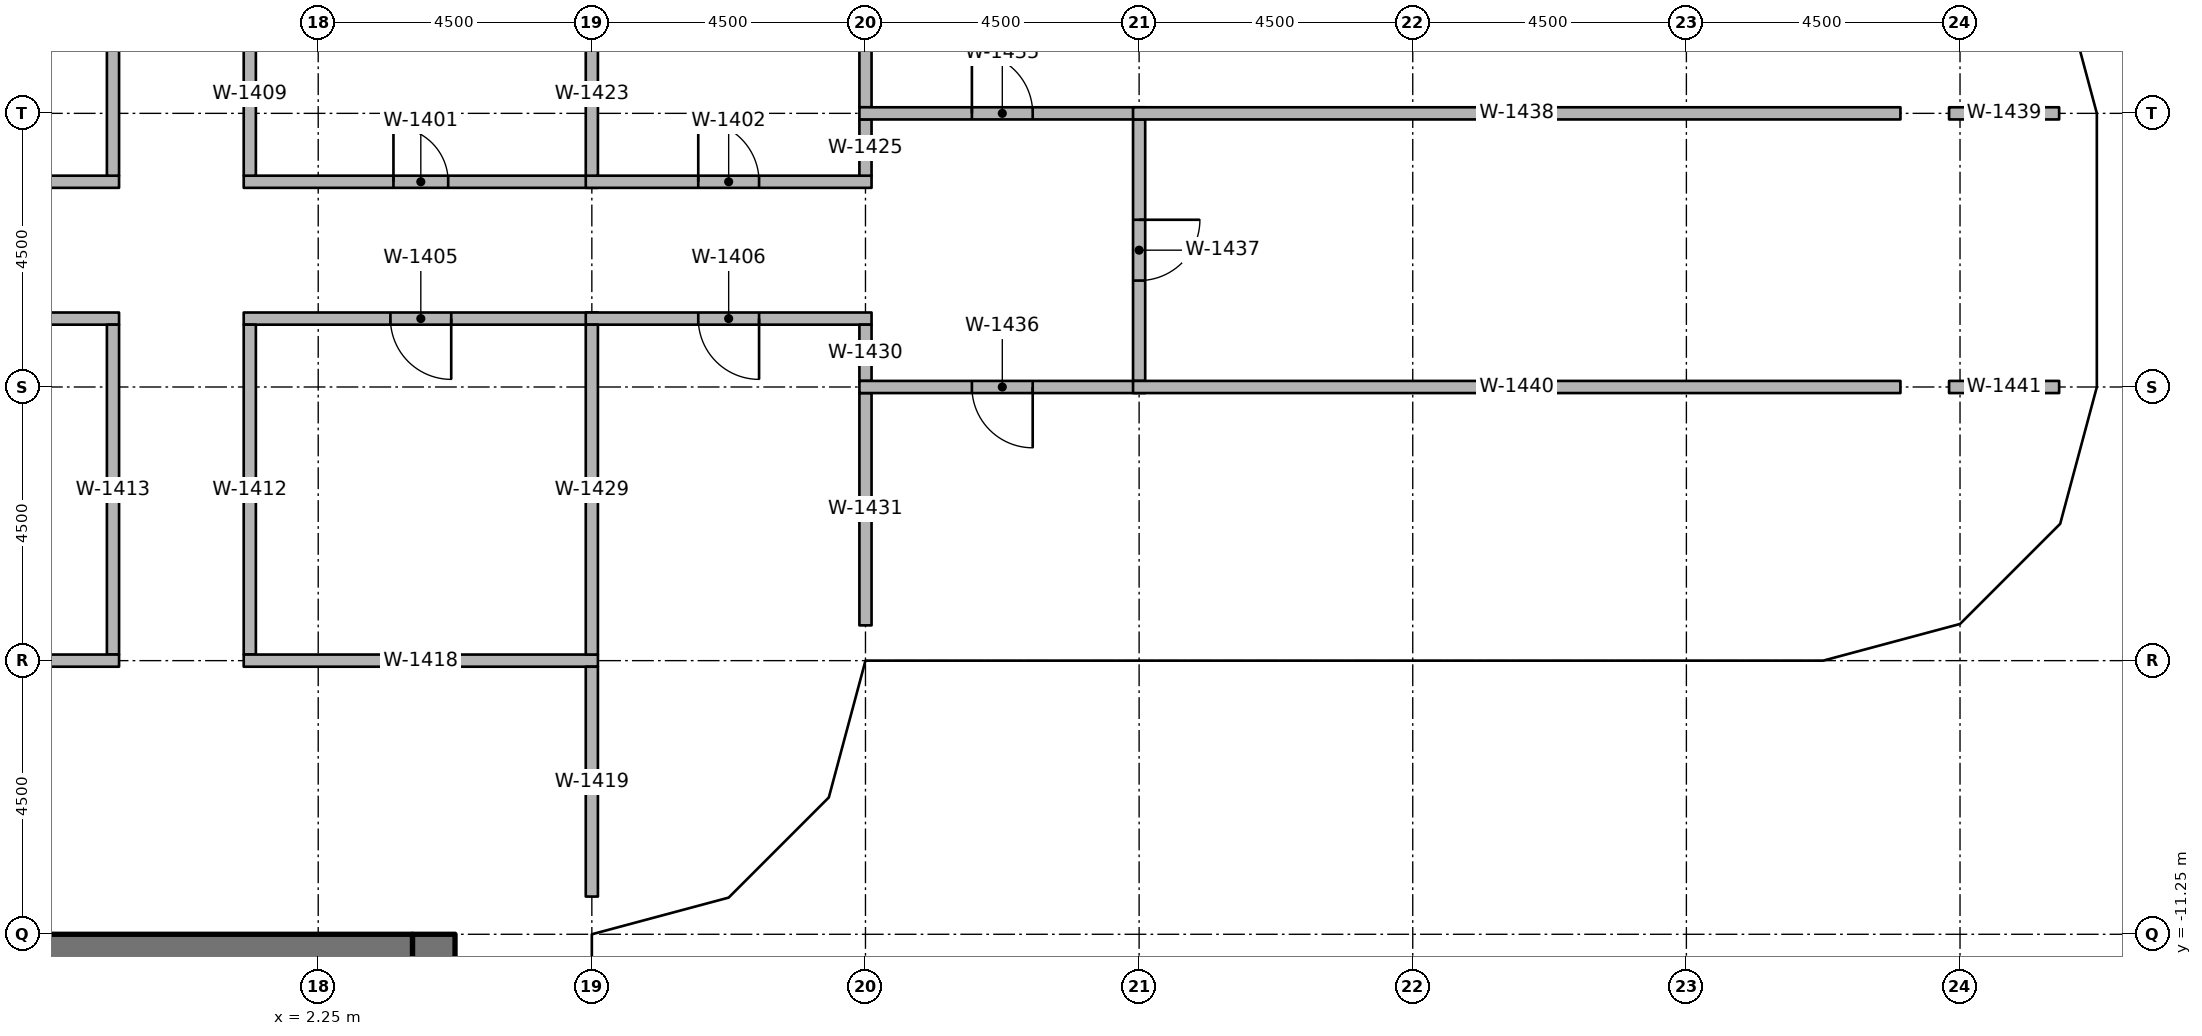
"""IFC4 building model, lengths in metres.
Left out: names, types, materials, properties, quantities, classifications, styles, units other than length and angle.
Written with IfcOpenShell. Run it as: python <this file> out.ifc"""

import sys

from ifc_helpers import new_model, si_unit, direction, frame, frame_2d, origin, origin_2d, place, context, subcontext, project, spatial, rectangle, extrude, element, fill, save


model = new_model("IFC4")
c1 = context("Model", 3, precision=1e-05, world=origin(), true_north=direction((0.0, 1.0)))
c2 = subcontext(c1, "Body", "Model", "MODEL_VIEW")
j1 = project(units=[si_unit("LENGTHUNIT", "METRE"), si_unit("PLANEANGLEUNIT", "RADIAN")], contexts=[c1])
p1 = place(None, origin())
s1 = spatial("IfcSite", under=j1, at=p1, CompositionType="ELEMENT")
p2 = place(p1, origin())
s2 = spatial("IfcBuilding", under=s1, at=p2, CompositionType="ELEMENT")
p3 = place(p2, frame((0.0, 0.0, 141.0)))
s3 = spatial("IfcBuildingStorey", under=s2, at=p3, CompositionType="ELEMENT", Elevation=141.0)
for number, where, z_axis, x_axis in (
    (1, (6.25, -10.75, 0.0), (0.0, 0.0, 1.0), (1.0, 0.0, 0.0)),
    (2, (6.25, -6.25, 0.0), (0.0, 0.0, 1.0), (1.0, 0.0, 0.0)),
    (3, (10.75, -6.25, 0.0), (0.0, 0.0, 1.0), (1.0, 0.0, 0.0)),
    (4, (15.75, -6.25, 0.0), (0.0, 0.0, 1.0), (1.0, 0.0, 0.0)),
    (5, (20.25, -6.11, 0.0), (0.0, 0.0, 1.0), (1.0, 0.0, 0.0)),
    (6, (24.75, -6.11, 0.0), (0.0, 0.0, 1.0), (1.0, 0.0, 0.0)),
    (7, (28.908, -5.475, 0.0), (0.0, 0.0, 1.0), (1.0, 0.0, 0.0)),
    (8, (28.67, -2.25, 0.0), (0.0, 0.0, 1.0), (1.0, 0.0, 0.0)),
    (9, (28.67, 2.25, 0.0), (0.0, 0.0, 1.0), (1.0, 0.0, 0.0)),
):
    element("IfcColumn", number, at=place(p3, frame(where, z_axis=z_axis, x_axis=x_axis)), inside=s3, PredefinedType="COLUMN", context=c2, shape_type="SweptSolid", body=[
        extrude(rectangle(XDim=0.8, YDim=0.8, at=origin_2d()), origin(), (0.0, 0.0, 1.0), 3.65),
    ])
p4 = place(p3, frame((4.15, -11.25, 0.0), z_axis=(0.0, 0.0, 1.0), x_axis=(0.0, -1.0, 0.0)))
e10 = element("IfcWall", 10, at=p4, inside=s3, PredefinedType="SHEAR", context=c2, shape_type="SweptSolid", body=[
    extrude(rectangle(XDim=15.0, YDim=0.7, at=frame_2d((7.5, 0.0))), origin(), (0.0, 0.0, 1.0), 3.8),
])
p5 = place(p4, frame((7.15, 0.0, 0.0)))
e11 = element("IfcOpeningElement", 11, at=p5, cuts=e10, PredefinedType="OPENING", context=c2, shape_type="SweptSolid", body=[
    extrude(rectangle(XDim=1.5, YDim=2.3, at=frame_2d((0.75, 1.15))), frame((0.0, 0.36, 0.0), z_axis=(0.0, -1.0, 0.0), x_axis=(1.0, 0.0, 0.0)), (0.0, 0.0, 1.0), 0.72),
])
p6 = place(p4, frame((13.9, 0.0, 0.0)))
e12 = element("IfcOpeningElement", 12, at=p6, cuts=e10, PredefinedType="OPENING", context=c2, shape_type="SweptSolid", body=[
    extrude(rectangle(XDim=0.9, YDim=2.1, at=frame_2d((0.45, 1.05))), frame((0.0, 0.36, 0.0), z_axis=(0.0, -1.0, 0.0), x_axis=(1.0, 0.0, 0.0)), (0.0, 0.0, 1.0), 0.72),
])
p7 = place(p4, frame((1.15, 0.0, 0.0)))
e13 = element("IfcOpeningElement", 13, at=p7, cuts=e10, PredefinedType="OPENING", context=c2, shape_type="SweptSolid", body=[
    extrude(rectangle(XDim=1.2, YDim=2.1, at=frame_2d((0.6, 1.05))), frame((0.0, 0.36, 0.0), z_axis=(0.0, -1.0, 0.0), x_axis=(1.0, 0.0, 0.0)), (0.0, 0.0, 1.0), 0.72),
])
p8 = place(p3, frame((-3.8, -11.6, 0.0), z_axis=(0.0, 0.0, 1.0), x_axis=(1.0, 0.0, 0.0)))
e14 = element("IfcWall", 14, at=p8, inside=s3, PredefinedType="SHEAR", context=c2, shape_type="SweptSolid", body=[
    extrude(rectangle(XDim=7.6, YDim=0.7, at=frame_2d((3.8, 0.0))), origin(), (0.0, 0.0, 1.0), 3.8),
])
p9 = place(p3, frame((1.025, 1.125, 0.0), z_axis=(0.0, 0.0, 1.0), x_axis=(1.0, 0.0, 0.0)))
e15 = element("IfcWall", 15, at=p9, inside=s3, PredefinedType="PARTITIONING", context=c2, shape_type="SweptSolid", body=[
    extrude(rectangle(XDim=5.825, YDim=0.2, at=frame_2d((2.913, 0.0))), origin(), (0.0, 0.0, 1.0), 2.75),
])
p10 = place(p9, frame((2.462, 0.0, 0.0)))
e16 = element("IfcOpeningElement", 16, at=p10, cuts=e15, PredefinedType="OPENING", context=c2, shape_type="SweptSolid", body=[
    extrude(rectangle(XDim=0.9, YDim=2.1, at=frame_2d((0.45, 1.05))), frame((0.0, 0.11, 0.0), z_axis=(0.0, -1.0, 0.0), x_axis=(1.0, 0.0, 0.0)), (0.0, 0.0, 1.0), 0.22),
])
p11 = place(p3, frame((6.65, 1.125, 0.0), z_axis=(0.0, 0.0, 1.0), x_axis=(1.0, 0.0, 0.0)))
e17 = element("IfcWall", 17, at=p11, inside=s3, PredefinedType="PARTITIONING", context=c2, shape_type="SweptSolid", body=[
    extrude(rectangle(XDim=4.7, YDim=0.2, at=frame_2d((2.35, 0.0))), origin(), (0.0, 0.0, 1.0), 2.75),
])
p12 = place(p11, frame((1.85, 0.0, 0.0)))
e18 = element("IfcOpeningElement", 18, at=p12, cuts=e17, PredefinedType="OPENING", context=c2, shape_type="SweptSolid", body=[
    extrude(rectangle(XDim=1.0, YDim=2.1, at=frame_2d((0.5, 1.05))), frame((0.0, 0.11, 0.0), z_axis=(0.0, -1.0, 0.0), x_axis=(1.0, 0.0, 0.0)), (0.0, 0.0, 1.0), 0.22),
])
p13 = place(p3, frame((-6.85, 1.125, 0.0), z_axis=(0.0, 0.0, 1.0), x_axis=(1.0, 0.0, 0.0)))
e19 = element("IfcWall", 19, at=p13, inside=s3, PredefinedType="PARTITIONING", context=c2, shape_type="SweptSolid", body=[
    extrude(rectangle(XDim=5.825, YDim=0.2, at=frame_2d((2.913, 0.0))), origin(), (0.0, 0.0, 1.0), 2.75),
])
p14 = place(p13, frame((2.413, 0.0, 0.0)))
e20 = element("IfcOpeningElement", 20, at=p14, cuts=e19, PredefinedType="OPENING", context=c2, shape_type="SweptSolid", body=[
    extrude(rectangle(XDim=1.0, YDim=2.1, at=frame_2d((0.5, 1.05))), frame((0.0, 0.11, 0.0), z_axis=(0.0, -1.0, 0.0), x_axis=(1.0, 0.0, 0.0)), (0.0, 0.0, 1.0), 0.22),
])
p15 = place(p3, frame((6.85, -1.125, 0.0), z_axis=(0.0, 0.0, 1.0), x_axis=(-1.0, 0.0, 0.0)))
e21 = element("IfcWall", 21, at=p15, inside=s3, PredefinedType="PARTITIONING", context=c2, shape_type="SweptSolid", body=[
    extrude(rectangle(XDim=5.825, YDim=0.2, at=frame_2d((2.913, 0.0))), origin(), (0.0, 0.0, 1.0), 2.75),
])
p16 = place(p15, frame((2.413, 0.0, 0.0)))
e22 = element("IfcOpeningElement", 22, at=p16, cuts=e21, PredefinedType="OPENING", context=c2, shape_type="SweptSolid", body=[
    extrude(rectangle(XDim=1.0, YDim=2.1, at=frame_2d((0.5, 1.05))), frame((0.0, 0.11, 0.0), z_axis=(0.0, -1.0, 0.0), x_axis=(1.0, 0.0, 0.0)), (0.0, 0.0, 1.0), 0.22),
])
p17 = place(p3, frame((11.35, -1.125, 0.0), z_axis=(0.0, 0.0, 1.0), x_axis=(-1.0, 0.0, 0.0)))
e23 = element("IfcWall", 23, at=p17, inside=s3, PredefinedType="PARTITIONING", context=c2, shape_type="SweptSolid", body=[
    extrude(rectangle(XDim=4.7, YDim=0.2, at=frame_2d((2.35, 0.0))), origin(), (0.0, 0.0, 1.0), 2.75),
])
p18 = place(p17, frame((1.85, 0.0, 0.0)))
e24 = element("IfcOpeningElement", 24, at=p18, cuts=e23, PredefinedType="OPENING", context=c2, shape_type="SweptSolid", body=[
    extrude(rectangle(XDim=1.0, YDim=2.1, at=frame_2d((0.5, 1.05))), frame((0.0, 0.11, 0.0), z_axis=(0.0, -1.0, 0.0), x_axis=(1.0, 0.0, 0.0)), (0.0, 0.0, 1.0), 0.22),
])
p19 = place(p3, frame((-1.025, -1.125, 0.0), z_axis=(0.0, 0.0, 1.0), x_axis=(-1.0, 0.0, 0.0)))
e25 = element("IfcWall", 25, at=p19, inside=s3, PredefinedType="PARTITIONING", context=c2, shape_type="SweptSolid", body=[
    extrude(rectangle(XDim=5.825, YDim=0.2, at=frame_2d((2.913, 0.0))), origin(), (0.0, 0.0, 1.0), 2.75),
])
p20 = place(p19, frame((2.413, 0.0, 0.0)))
e26 = element("IfcOpeningElement", 26, at=p20, cuts=e25, PredefinedType="OPENING", context=c2, shape_type="SweptSolid", body=[
    extrude(rectangle(XDim=1.0, YDim=2.1, at=frame_2d((0.5, 1.05))), frame((0.0, 0.11, 0.0), z_axis=(0.0, -1.0, 0.0), x_axis=(1.0, 0.0, 0.0)), (0.0, 0.0, 1.0), 0.22),
])
p21 = place(p3, frame((1.125, 1.225, 0.0), z_axis=(0.0, 0.0, 1.0), x_axis=(0.0, 1.0, 0.0)))
e27 = element("IfcWall", 27, at=p21, inside=s3, PredefinedType="PARTITIONING", context=c2, shape_type="SweptSolid", body=[
    extrude(rectangle(XDim=2.675, YDim=0.2, at=frame_2d((1.337, 0.0))), origin(), (0.0, 0.0, 1.0), 2.75),
])
for number, where, z_axis, x_axis in (
    (28, (-1.125, 1.225, 0.0), (0.0, 0.0, 1.0), (0.0, 1.0, 0.0)),
    (29, (1.125, -6.65, 0.0), (0.0, 0.0, 1.0), (0.0, 1.0, 0.0)),
    (30, (-1.125, -6.65, 0.0), (0.0, 0.0, 1.0), (0.0, 1.0, 0.0)),
):
    element("IfcWall", number, at=place(p3, frame(where, z_axis=z_axis, x_axis=x_axis)), inside=s3, PredefinedType="PARTITIONING", context=c2, shape_type="SweptSolid", body=[
        extrude(rectangle(XDim=5.425, YDim=0.2, at=frame_2d((2.712, 0.0))), origin(), (0.0, 0.0, 1.0), 2.75),
    ])
p22 = place(p3, frame((1.025, -6.75, 0.0), z_axis=(0.0, 0.0, 1.0), x_axis=(1.0, 0.0, 0.0)))
e31 = element("IfcWall", 31, at=p22, inside=s3, PredefinedType="PARTITIONING", context=c2, shape_type="SweptSolid", body=[
    extrude(rectangle(XDim=5.825, YDim=0.2, at=frame_2d((2.913, 0.0))), origin(), (0.0, 0.0, 1.0), 2.75),
])
p23 = place(p3, frame((6.75, -10.63, 0.0), z_axis=(0.0, 0.0, 1.0), x_axis=(0.0, 1.0, 0.0)))
e32 = element("IfcWall", 32, at=p23, inside=s3, PredefinedType="PARTITIONING", context=c2, shape_type="SweptSolid", body=[
    extrude(rectangle(XDim=3.78, YDim=0.2, at=frame_2d((1.89, 0.0))), origin(), (0.0, 0.0, 1.0), 2.75),
])
p24 = place(p3, frame((-6.85, -6.75, 0.0), z_axis=(0.0, 0.0, 1.0), x_axis=(1.0, 0.0, 0.0)))
e33 = element("IfcWall", 33, at=p24, inside=s3, PredefinedType="PARTITIONING", context=c2, shape_type="SweptSolid", body=[
    extrude(rectangle(XDim=5.825, YDim=0.2, at=frame_2d((2.913, 0.0))), origin(), (0.0, 0.0, 1.0), 2.75),
])
p25 = place(p3, frame((6.75, 1.225, 0.0), z_axis=(0.0, 0.0, 1.0), x_axis=(0.0, 1.0, 0.0)))
e34 = element("IfcWall", 34, at=p25, inside=s3, PredefinedType="PARTITIONING", context=c2, shape_type="SweptSolid", body=[
    extrude(rectangle(XDim=2.675, YDim=0.2, at=frame_2d((1.337, 0.0))), origin(), (0.0, 0.0, 1.0), 2.75),
])
p26 = place(p3, frame((11.25, 1.225, 0.0), z_axis=(0.0, 0.0, 1.0), x_axis=(0.0, 1.0, 0.0)))
e35 = element("IfcWall", 35, at=p26, inside=s3, PredefinedType="PARTITIONING", context=c2, shape_type="SweptSolid", body=[
    extrude(rectangle(XDim=0.925, YDim=0.2, at=frame_2d((0.462, 0.0))), origin(), (0.0, 0.0, 1.0), 2.75),
])
p27 = place(p3, frame((11.25, 2.35, 0.0), z_axis=(0.0, 0.0, 1.0), x_axis=(0.0, 1.0, 0.0)))
e36 = element("IfcWall", 36, at=p27, inside=s3, PredefinedType="PARTITIONING", context=c2, shape_type="SweptSolid", body=[
    extrude(rectangle(XDim=3.82, YDim=0.2, at=frame_2d((1.91, 0.0))), origin(), (0.0, 0.0, 1.0), 2.75),
])
p28 = place(p3, frame((6.75, -6.65, 0.0), z_axis=(0.0, 0.0, 1.0), x_axis=(0.0, 1.0, 0.0)))
e37 = element("IfcWall", 37, at=p28, inside=s3, PredefinedType="PARTITIONING", context=c2, shape_type="SweptSolid", body=[
    extrude(rectangle(XDim=5.425, YDim=0.2, at=frame_2d((2.712, 0.0))), origin(), (0.0, 0.0, 1.0), 2.75),
])
p29 = place(p3, frame((11.25, -2.15, 0.0), z_axis=(0.0, 0.0, 1.0), x_axis=(0.0, 1.0, 0.0)))
e38 = element("IfcWall", 38, at=p29, inside=s3, PredefinedType="PARTITIONING", context=c2, shape_type="SweptSolid", body=[
    extrude(rectangle(XDim=0.925, YDim=0.2, at=frame_2d((0.462, 0.0))), origin(), (0.0, 0.0, 1.0), 2.75),
])
p30 = place(p3, frame((11.25, -6.17, 0.0), z_axis=(0.0, 0.0, 1.0), x_axis=(0.0, 1.0, 0.0)))
e39 = element("IfcWall", 39, at=p30, inside=s3, PredefinedType="PARTITIONING", context=c2, shape_type="SweptSolid", body=[
    extrude(rectangle(XDim=3.82, YDim=0.2, at=frame_2d((1.91, 0.0))), origin(), (0.0, 0.0, 1.0), 2.75),
])
p31 = place(p3, frame((11.15, 2.25, 0.0), z_axis=(0.0, 0.0, 1.0), x_axis=(1.0, 0.0, 0.0)))
e40 = element("IfcWall", 40, at=p31, inside=s3, PredefinedType="PARTITIONING", context=c2, shape_type="SweptSolid", body=[
    extrude(rectangle(XDim=4.7, YDim=0.2, at=frame_2d((2.35, 0.0))), origin(), (0.0, 0.0, 1.0), 2.75),
])
p32 = place(p31, frame((1.85, 0.0, 0.0)))
e41 = element("IfcOpeningElement", 41, at=p32, cuts=e40, PredefinedType="OPENING", context=c2, shape_type="SweptSolid", body=[
    extrude(rectangle(XDim=1.0, YDim=2.1, at=frame_2d((0.5, 1.05))), frame((0.0, 0.11, 0.0), z_axis=(0.0, -1.0, 0.0), x_axis=(1.0, 0.0, 0.0)), (0.0, 0.0, 1.0), 0.22),
])
p33 = place(p3, frame((15.85, -2.25, 0.0), z_axis=(0.0, 0.0, 1.0), x_axis=(-1.0, 0.0, 0.0)))
e42 = element("IfcWall", 42, at=p33, inside=s3, PredefinedType="PARTITIONING", context=c2, shape_type="SweptSolid", body=[
    extrude(rectangle(XDim=4.7, YDim=0.2, at=frame_2d((2.35, 0.0))), origin(), (0.0, 0.0, 1.0), 2.75),
])
p34 = place(p33, frame((1.85, 0.0, 0.0)))
e43 = element("IfcOpeningElement", 43, at=p34, cuts=e42, PredefinedType="OPENING", context=c2, shape_type="SweptSolid", body=[
    extrude(rectangle(XDim=1.0, YDim=2.1, at=frame_2d((0.5, 1.05))), frame((0.0, 0.11, 0.0), z_axis=(0.0, -1.0, 0.0), x_axis=(1.0, 0.0, 0.0)), (0.0, 0.0, 1.0), 0.22),
])
p35 = place(p3, frame((15.75, 2.15, 0.0), z_axis=(0.0, 0.0, 1.0), x_axis=(0.0, -1.0, 0.0)))
e44 = element("IfcWall", 44, at=p35, inside=s3, PredefinedType="PARTITIONING", context=c2, shape_type="SweptSolid", body=[
    extrude(rectangle(XDim=4.3, YDim=0.2, at=frame_2d((2.15, 0.0))), origin(), (0.0, 0.0, 1.0), 2.75),
])
p36 = place(p35, frame((1.65, 0.0, 0.0)))
e45 = element("IfcOpeningElement", 45, at=p36, cuts=e44, PredefinedType="OPENING", context=c2, shape_type="SweptSolid", body=[
    extrude(rectangle(XDim=1.0, YDim=2.1, at=frame_2d((0.5, 1.05))), frame((0.0, 0.11, 0.0), z_axis=(0.0, -1.0, 0.0), x_axis=(1.0, 0.0, 0.0)), (0.0, 0.0, 1.0), 0.22),
])
p37 = place(p3, frame((15.65, 2.25, 0.0), z_axis=(0.0, 0.0, 1.0), x_axis=(1.0, 0.0, 0.0)))
e46 = element("IfcWall", 46, at=p37, inside=s3, PredefinedType="PARTITIONING", context=c2, shape_type="SweptSolid", body=[
    extrude(rectangle(XDim=12.62, YDim=0.2, at=frame_2d((6.31, 0.0))), origin(), (0.0, 0.0, 1.0), 2.75),
])
p38 = place(p3, frame((29.07, 2.25, 0.0), z_axis=(0.0, 0.0, 1.0), x_axis=(1.0, 0.0, 0.0)))
e47 = element("IfcWall", 47, at=p38, inside=s3, PredefinedType="PARTITIONING", context=c2, shape_type="SweptSolid", body=[
    extrude(rectangle(XDim=1.81, YDim=0.2, at=frame_2d((0.905, 0.0))), origin(), (0.0, 0.0, 1.0), 2.75),
])
p39 = place(p3, frame((15.65, -2.25, 0.0), z_axis=(0.0, 0.0, 1.0), x_axis=(1.0, 0.0, 0.0)))
e48 = element("IfcWall", 48, at=p39, inside=s3, PredefinedType="PARTITIONING", context=c2, shape_type="SweptSolid", body=[
    extrude(rectangle(XDim=12.62, YDim=0.2, at=frame_2d((6.31, 0.0))), origin(), (0.0, 0.0, 1.0), 2.75),
])
p40 = place(p3, frame((29.07, -2.25, 0.0), z_axis=(0.0, 0.0, 1.0), x_axis=(1.0, 0.0, 0.0)))
e49 = element("IfcWall", 49, at=p40, inside=s3, PredefinedType="PARTITIONING", context=c2, shape_type="SweptSolid", body=[
    extrude(rectangle(XDim=1.81, YDim=0.2, at=frame_2d((0.905, 0.0))), origin(), (0.0, 0.0, 1.0), 2.75),
])
p41 = place(p36, origin())
e50 = element("IfcDoor", 50, at=p41, inside=s3, OperationType="SINGLE_SWING_RIGHT", PredefinedType="DOOR", context=c2, shape_type="SweptSolid", body=[
    extrude(rectangle(XDim=1.0, YDim=2.1, at=frame_2d((0.5, 1.05))), frame((0.0, 0.025, 0.0), z_axis=(0.0, -1.0, 0.0), x_axis=(1.0, 0.0, 0.0)), (0.0, 0.0, 1.0), 0.05),
])
fill(e45, e50)
p42 = place(p32, origin())
e51 = element("IfcDoor", 51, at=p42, inside=s3, OperationType="SINGLE_SWING_RIGHT", PredefinedType="DOOR", context=c2, shape_type="SweptSolid", body=[
    extrude(rectangle(XDim=1.0, YDim=2.1, at=frame_2d((0.5, 1.05))), frame((0.0, 0.025, 0.0), z_axis=(0.0, -1.0, 0.0), x_axis=(1.0, 0.0, 0.0)), (0.0, 0.0, 1.0), 0.05),
])
fill(e41, e51)
p43 = place(p34, origin())
e52 = element("IfcDoor", 52, at=p43, inside=s3, OperationType="SINGLE_SWING_RIGHT", PredefinedType="DOOR", context=c2, shape_type="SweptSolid", body=[
    extrude(rectangle(XDim=1.0, YDim=2.1, at=frame_2d((0.5, 1.05))), frame((0.0, 0.025, 0.0), z_axis=(0.0, -1.0, 0.0), x_axis=(1.0, 0.0, 0.0)), (0.0, 0.0, 1.0), 0.05),
])
fill(e43, e52)
p44 = place(p10, origin())
e53 = element("IfcDoor", 53, at=p44, inside=s3, OperationType="SINGLE_SWING_RIGHT", PredefinedType="DOOR", context=c2, shape_type="SweptSolid", body=[
    extrude(rectangle(XDim=0.9, YDim=2.1, at=frame_2d((0.45, 1.05))), frame((0.0, 0.025, 0.0), z_axis=(0.0, -1.0, 0.0), x_axis=(1.0, 0.0, 0.0)), (0.0, 0.0, 1.0), 0.05),
])
fill(e16, e53)
p45 = place(p12, origin())
e54 = element("IfcDoor", 54, at=p45, inside=s3, OperationType="SINGLE_SWING_RIGHT", PredefinedType="DOOR", context=c2, shape_type="SweptSolid", body=[
    extrude(rectangle(XDim=1.0, YDim=2.1, at=frame_2d((0.5, 1.05))), frame((0.0, 0.025, 0.0), z_axis=(0.0, -1.0, 0.0), x_axis=(1.0, 0.0, 0.0)), (0.0, 0.0, 1.0), 0.05),
])
fill(e18, e54)
p46 = place(p16, origin())
e55 = element("IfcDoor", 55, at=p46, inside=s3, OperationType="SINGLE_SWING_RIGHT", PredefinedType="DOOR", context=c2, shape_type="SweptSolid", body=[
    extrude(rectangle(XDim=1.0, YDim=2.1, at=frame_2d((0.5, 1.05))), frame((0.0, 0.025, 0.0), z_axis=(0.0, -1.0, 0.0), x_axis=(1.0, 0.0, 0.0)), (0.0, 0.0, 1.0), 0.05),
])
fill(e22, e55)
p47 = place(p18, origin())
e56 = element("IfcDoor", 56, at=p47, inside=s3, OperationType="SINGLE_SWING_RIGHT", PredefinedType="DOOR", context=c2, shape_type="SweptSolid", body=[
    extrude(rectangle(XDim=1.0, YDim=2.1, at=frame_2d((0.5, 1.05))), frame((0.0, 0.025, 0.0), z_axis=(0.0, -1.0, 0.0), x_axis=(1.0, 0.0, 0.0)), (0.0, 0.0, 1.0), 0.05),
])
fill(e24, e56)
save(model, sys.argv[1])
